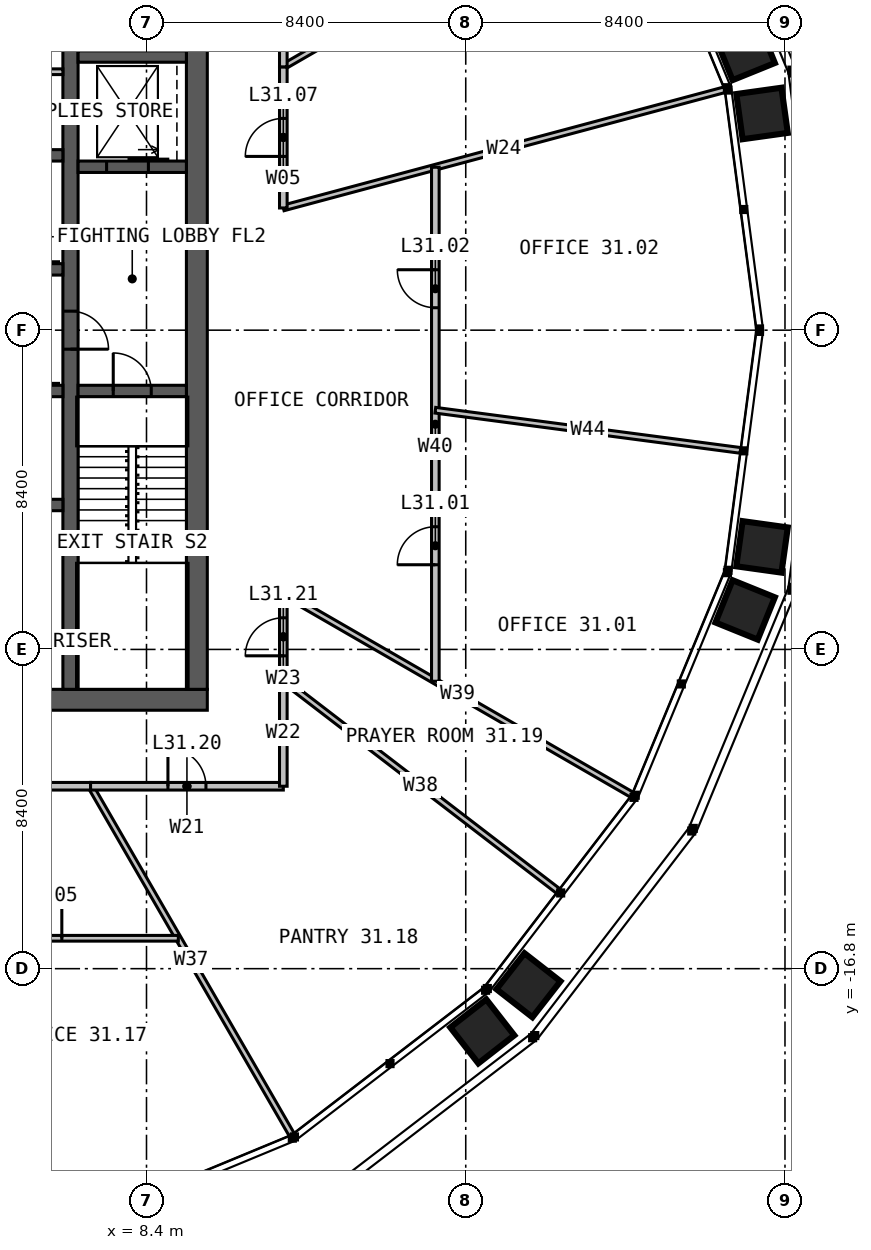
"""IFC4 building model, lengths in metres.
Left out: names, types, materials, properties, quantities, classifications, styles, units other than length and angle.
Written with IfcOpenShell. Run it as: python <this file> out.ifc"""

import sys

from ifc_helpers import new_model, si_unit, direction, frame, frame_2d, origin, place, context, subcontext, project, spatial, rectangle, extrude, element, fill, save


model = new_model("IFC4")
c1 = context("Model", 3, precision=1e-05, world=origin(), true_north=direction((0.0, 1.0)))
c2 = subcontext(c1, "Body", "Model", "MODEL_VIEW")
j1 = project(units=[si_unit("LENGTHUNIT", "METRE"), si_unit("PLANEANGLEUNIT", "RADIAN")], contexts=[c1])
p1 = place(None, origin())
s1 = spatial("IfcSite", under=j1, at=p1, CompositionType="ELEMENT")
p2 = place(p1, origin())
s2 = spatial("IfcBuilding", under=s1, at=p2, CompositionType="ELEMENT")
p3 = place(p2, frame((0.0, 0.0, 130.0)))
s3 = spatial("IfcBuildingStorey", under=s2, at=p3, CompositionType="ELEMENT", Elevation=130.0)
p4 = place(p3, frame((10.0, -9.725, 0.0), z_axis=(0.0, 0.0, 1.0), x_axis=(-1.0, 0.0, 0.0)))
e1 = element("IfcWall", 1, at=p4, inside=s3, PredefinedType="SOLIDWALL", context=c2, shape_type="SweptSolid", body=[
    extrude(rectangle(XDim=20.0, YDim=0.55, at=frame_2d((10.0, 0.0))), origin(), (0.0, 0.0, 1.0), 4.0),
])
p5 = place(p4, frame((6.875, 0.0, 0.0)))
e2 = element("IfcOpeningElement", 2, at=p5, cuts=e1, PredefinedType="OPENING", context=c2, shape_type="SweptSolid", body=[
    extrude(rectangle(XDim=1.2, YDim=2.2, at=frame_2d((0.6, 1.1))), frame((0.0, 0.285, 0.0), z_axis=(0.0, -1.0, 0.0), x_axis=(1.0, 0.0, 0.0)), (0.0, 0.0, 1.0), 0.57),
])
p6 = place(p3, frame((9.725, -9.45, 0.0), z_axis=(0.0, 0.0, 1.0), x_axis=(0.0, 1.0, 0.0)))
e3 = element("IfcWall", 3, at=p6, inside=s3, PredefinedType="SOLIDWALL", context=c2, shape_type="SweptSolid", body=[
    extrude(rectangle(XDim=18.9, YDim=0.55, at=frame_2d((9.45, 0.0))), origin(), (0.0, 0.0, 1.0), 4.0),
])
p7 = place(p3, frame((6.4, 9.45, 0.0), z_axis=(0.0, 0.0, 1.0), x_axis=(0.0, -1.0, 0.0)))
e4 = element("IfcWall", 4, at=p7, inside=s3, PredefinedType="SOLIDWALL", context=c2, shape_type="SweptSolid", body=[
    extrude(rectangle(XDim=18.9, YDim=0.4, at=frame_2d((9.45, 0.0))), origin(), (0.0, 0.0, 1.0), 4.0),
])
p8 = place(p7, frame((8.95, 0.0, 0.0)))
e5 = element("IfcOpeningElement", 5, at=p8, cuts=e4, PredefinedType="OPENING", context=c2, shape_type="SweptSolid", body=[
    extrude(rectangle(XDim=1.0, YDim=2.2, at=frame_2d((0.5, 1.1))), frame((0.0, 0.21, 0.0), z_axis=(0.0, -1.0, 0.0), x_axis=(1.0, 0.0, 0.0)), (0.0, 0.0, 1.0), 0.42),
])
p9 = place(p3, frame((1.35, 1.6, 0.0), z_axis=(0.0, 0.0, 1.0), x_axis=(1.0, 0.0, 0.0)))
e6 = element("IfcWall", 6, at=p9, inside=s3, PredefinedType="SOLIDWALL", context=c2, shape_type="SweptSolid", body=[
    extrude(rectangle(XDim=4.85, YDim=0.3, at=frame_2d((2.425, 0.0))), origin(), (0.0, 0.0, 1.0), 4.0),
])
p10 = place(p9, frame((0.6, 0.0, 0.0)))
e7 = element("IfcOpeningElement", 7, at=p10, cuts=e6, PredefinedType="OPENING", context=c2, shape_type="SweptSolid", body=[
    extrude(rectangle(XDim=1.1, YDim=2.2, at=frame_2d((0.55, 1.1))), frame((0.0, 0.16, 0.0), z_axis=(0.0, -1.0, 0.0), x_axis=(1.0, 0.0, 0.0)), (0.0, 0.0, 1.0), 0.32),
])
p11 = place(p9, frame((3.125, 0.0, 0.0)))
e8 = element("IfcOpeningElement", 8, at=p11, cuts=e6, PredefinedType="OPENING", context=c2, shape_type="SweptSolid", body=[
    extrude(rectangle(XDim=1.1, YDim=2.2, at=frame_2d((0.55, 1.1))), frame((0.0, 0.16, 0.0), z_axis=(0.0, -1.0, 0.0), x_axis=(1.0, 0.0, 0.0)), (0.0, 0.0, 1.0), 0.32),
])
p12 = place(p3, frame((1.35, 4.6, 0.0), z_axis=(0.0, 0.0, 1.0), x_axis=(1.0, 0.0, 0.0)))
e9 = element("IfcWall", 9, at=p12, inside=s3, PredefinedType="SOLIDWALL", context=c2, shape_type="SweptSolid", body=[
    extrude(rectangle(XDim=4.85, YDim=0.3, at=frame_2d((2.425, 0.0))), origin(), (0.0, 0.0, 1.0), 4.0),
])
p13 = place(p3, frame((3.85, -1.6, 0.0), z_axis=(0.0, 0.0, 1.0), x_axis=(1.0, 0.0, 0.0)))
e10 = element("IfcWall", 10, at=p13, inside=s3, PredefinedType="SOLIDWALL", context=c2, shape_type="SweptSolid", body=[
    extrude(rectangle(XDim=2.35, YDim=0.3, at=frame_2d((1.175, 0.0))), origin(), (0.0, 0.0, 1.0), 4.0),
])
p14 = place(p13, frame((0.625, 0.0, 0.0)))
e11 = element("IfcOpeningElement", 11, at=p14, cuts=e10, PredefinedType="OPENING", context=c2, shape_type="SweptSolid", body=[
    extrude(rectangle(XDim=1.1, YDim=2.2, at=frame_2d((0.55, 1.1))), frame((0.0, 0.16, 0.0), z_axis=(0.0, -1.0, 0.0), x_axis=(1.0, 0.0, 0.0)), (0.0, 0.0, 1.0), 0.32),
])
p15 = place(p3, frame((3.85, -4.6, 0.0), z_axis=(0.0, 0.0, 1.0), x_axis=(1.0, 0.0, 0.0)))
e12 = element("IfcWall", 12, at=p15, inside=s3, PredefinedType="SOLIDWALL", context=c2, shape_type="SweptSolid", body=[
    extrude(rectangle(XDim=2.35, YDim=0.3, at=frame_2d((1.175, 0.0))), origin(), (0.0, 0.0, 1.0), 4.0),
])
p16 = place(p3, frame((6.6, -1.6, 0.0), z_axis=(0.0, 0.0, 1.0), x_axis=(1.0, 0.0, 0.0)))
e13 = element("IfcWall", 13, at=p16, inside=s3, PredefinedType="SOLIDWALL", context=c2, shape_type="SweptSolid", body=[
    extrude(rectangle(XDim=2.85, YDim=0.3, at=frame_2d((1.425, 0.0))), origin(), (0.0, 0.0, 1.0), 4.0),
])
p17 = place(p16, frame((0.925, 0.0, 0.0)))
e14 = element("IfcOpeningElement", 14, at=p17, cuts=e13, PredefinedType="OPENING", context=c2, shape_type="SweptSolid", body=[
    extrude(rectangle(XDim=1.0, YDim=2.2, at=frame_2d((0.5, 1.1))), frame((0.0, 0.16, 0.0), z_axis=(0.0, -1.0, 0.0), x_axis=(1.0, 0.0, 0.0)), (0.0, 0.0, 1.0), 0.32),
])
p18 = place(p3, frame((6.6, 4.3, 0.0), z_axis=(0.0, 0.0, 1.0), x_axis=(1.0, 0.0, 0.0)))
e15 = element("IfcWall", 15, at=p18, inside=s3, PredefinedType="SOLIDWALL", context=c2, shape_type="SweptSolid", body=[
    extrude(rectangle(XDim=2.85, YDim=0.3, at=frame_2d((1.425, 0.0))), origin(), (0.0, 0.0, 1.0), 4.0),
])
p19 = place(p18, frame((0.75, 0.0, 0.0)))
e16 = element("IfcOpeningElement", 16, at=p19, cuts=e15, PredefinedType="OPENING", context=c2, shape_type="SweptSolid", body=[
    extrude(rectangle(XDim=1.1, YDim=2.2, at=frame_2d((0.55, 1.1))), frame((0.0, 0.16, 0.0), z_axis=(0.0, -1.0, 0.0), x_axis=(1.0, 0.0, 0.0)), (0.0, 0.0, 1.0), 0.32),
])
p20 = place(p3, frame((6.6, 7.2, 0.0), z_axis=(0.0, 0.0, 1.0), x_axis=(1.0, 0.0, 0.0)))
e17 = element("IfcWall", 17, at=p20, inside=s3, PredefinedType="SOLIDWALL", context=c2, shape_type="SweptSolid", body=[
    extrude(rectangle(XDim=2.85, YDim=0.3, at=frame_2d((1.425, 0.0))), origin(), (0.0, 0.0, 1.0), 4.0),
])
p21 = place(p3, frame((1.35, 6.8, 0.0), z_axis=(0.0, 0.0, 1.0), x_axis=(1.0, 0.0, 0.0)))
e18 = element("IfcWall", 18, at=p21, inside=s3, PredefinedType="PARTITIONING", context=c2, shape_type="SweptSolid", body=[
    extrude(rectangle(XDim=4.85, YDim=0.15, at=frame_2d((2.425, 0.0))), origin(), (0.0, 0.0, 1.0), 3.75),
])
p22 = place(p21, frame((3.15, 0.0, 0.0)))
e19 = element("IfcOpeningElement", 19, at=p22, cuts=e18, PredefinedType="OPENING", context=c2, shape_type="SweptSolid", body=[
    extrude(rectangle(XDim=0.9, YDim=2.2, at=frame_2d((0.45, 1.1))), frame((0.0, 0.085, 0.0), z_axis=(0.0, -1.0, 0.0), x_axis=(1.0, 0.0, 0.0)), (0.0, 0.0, 1.0), 0.17),
])
p23 = place(p3, frame((12.0, -6.928, 0.0), z_axis=(0.0, 0.0, 1.0), x_axis=(0.866023526577, -0.500003251404, 0.0)))
e20 = element("IfcWall", 20, at=p23, inside=s3, PredefinedType="PARTITIONING", context=c2, shape_type="SweptSolid", body=[
    extrude(rectangle(XDim=10.587, YDim=0.15, at=frame_2d((5.293, 0.0))), origin(), (0.0, 0.0, 1.0), 2.79),
])
p24 = place(p3, frame((12.0, 3.215, 0.0), z_axis=(0.0, 0.0, 1.0), x_axis=(0.965923753467, 0.258826780857, 0.0)))
e21 = element("IfcWall", 21, at=p24, inside=s3, PredefinedType="PARTITIONING", context=c2, shape_type="SweptSolid", body=[
    extrude(rectangle(XDim=12.02, YDim=0.15, at=frame_2d((6.01, 0.0))), origin(), (0.0, 0.0, 1.0), 2.79),
])
for number, where, z_axis, x_axis in (
    (22, (12.0, 6.928, 0.0), (0.0, 0.0, 1.0), (0.866, 0.5, 0.0)),
    (23, (6.928, -12.0, 0.0), (0.0, 0.0, 1.0), (0.5, -0.866, 0.0)),
):
    element("IfcWall", number, at=place(p3, frame(where, z_axis=z_axis, x_axis=x_axis)), inside=s3, PredefinedType="PARTITIONING", context=c2, shape_type="SweptSolid", body=[
        extrude(rectangle(XDim=10.587, YDim=0.15, at=frame_2d((5.293, 0.0))), origin(), (0.0, 0.0, 1.0), 2.79),
    ])
p25 = place(p3, frame((12.0, -9.208, 0.0), z_axis=(0.0, 0.0, 1.0), x_axis=(0.793367728965, -0.608742676865, 0.0)))
e24 = element("IfcWall", 24, at=p25, inside=s3, PredefinedType="PARTITIONING", context=c2, shape_type="SweptSolid", body=[
    extrude(rectangle(XDim=9.108, YDim=0.15, at=frame_2d((4.554, 0.0))), origin(), (0.0, 0.0, 1.0), 2.79),
])
p26 = place(p3, frame((16.0, -9.238, 0.0), z_axis=(0.0, 0.0, 1.0), x_axis=(0.0, 1.0, 0.0)))
e25 = element("IfcWall", 25, at=p26, inside=s3, PredefinedType="PARTITIONING", context=c2, shape_type="SweptSolid", body=[
    extrude(rectangle(XDim=13.525, YDim=0.2, at=frame_2d((6.762, 0.0))), origin(), (0.0, 0.0, 1.0), 3.8),
])
p27 = place(p26, frame((3.066, 0.0, 0.0)))
e26 = element("IfcOpeningElement", 26, at=p27, cuts=e25, PredefinedType="OPENING", context=c2, shape_type="SweptSolid", body=[
    extrude(rectangle(XDim=1.0, YDim=2.2, at=frame_2d((0.5, 1.1))), frame((0.0, 0.11, 0.0), z_axis=(0.0, -1.0, 0.0), x_axis=(1.0, 0.0, 0.0)), (0.0, 0.0, 1.0), 0.22),
])
p28 = place(p26, frame((9.828, 0.0, 0.0)))
e27 = element("IfcOpeningElement", 27, at=p28, cuts=e25, PredefinedType="OPENING", context=c2, shape_type="SweptSolid", body=[
    extrude(rectangle(XDim=1.0, YDim=2.2, at=frame_2d((0.5, 1.1))), frame((0.0, 0.11, 0.0), z_axis=(0.0, -1.0, 0.0), x_axis=(1.0, 0.0, 0.0)), (0.0, 0.0, 1.0), 0.22),
])
p29 = place(p3, frame((16.0, -2.106, 0.0), z_axis=(0.0, 0.0, 1.0), x_axis=(0.99144669858, -0.130512236494, 0.0)))
e28 = element("IfcWall", 28, at=p29, inside=s3, PredefinedType="PARTITIONING", context=c2, shape_type="SweptSolid", body=[
    extrude(rectangle(XDim=8.096, YDim=0.15, at=frame_2d((4.048, 0.0))), origin(), (0.0, 0.0, 1.0), 2.79),
])
p30 = place(p3, frame((12.0, 3.215, 0.0), z_axis=(0.0, 0.0, 1.0), x_axis=(0.0, 1.0, 0.0)))
e29 = element("IfcWall", 29, at=p30, inside=s3, PredefinedType="PARTITIONING", context=c2, shape_type="SweptSolid", body=[
    extrude(rectangle(XDim=3.713, YDim=0.2, at=frame_2d((1.856, 0.0))), origin(), (0.0, 0.0, 1.0), 3.8),
])
p31 = place(p30, frame((1.356, 0.0, 0.0)))
e30 = element("IfcOpeningElement", 30, at=p31, cuts=e29, PredefinedType="OPENING", context=c2, shape_type="SweptSolid", body=[
    extrude(rectangle(XDim=1.0, YDim=2.2, at=frame_2d((0.5, 1.1))), frame((0.0, 0.11, 0.0), z_axis=(0.0, -1.0, 0.0), x_axis=(1.0, 0.0, 0.0)), (0.0, 0.0, 1.0), 0.22),
])
p32 = place(p3, frame((12.0, 6.928, 0.0), z_axis=(0.0, 0.0, 1.0), x_axis=(0.0, 1.0, 0.0)))
e31 = element("IfcWall", 31, at=p32, inside=s3, PredefinedType="PARTITIONING", context=c2, shape_type="SweptSolid", body=[
    extrude(rectangle(XDim=5.072, YDim=0.2, at=frame_2d((2.536, 0.0))), origin(), (0.0, 0.0, 1.0), 3.8),
])
p33 = place(p32, frame((2.036, 0.0, 0.0)))
e32 = element("IfcOpeningElement", 32, at=p33, cuts=e31, PredefinedType="OPENING", context=c2, shape_type="SweptSolid", body=[
    extrude(rectangle(XDim=1.0, YDim=2.2, at=frame_2d((0.5, 1.1))), frame((0.0, 0.11, 0.0), z_axis=(0.0, -1.0, 0.0), x_axis=(1.0, 0.0, 0.0)), (0.0, 0.0, 1.0), 0.22),
])
p34 = place(p3, frame((-9.238, -16.0, 0.0), z_axis=(0.0, 0.0, 1.0), x_axis=(1.0, 0.0, 0.0)))
e33 = element("IfcWall", 33, at=p34, inside=s3, PredefinedType="PARTITIONING", context=c2, shape_type="SweptSolid", body=[
    extrude(rectangle(XDim=18.475, YDim=0.15, at=frame_2d((9.238, 0.0))), origin(), (0.0, 0.0, 1.0), 2.79),
])
p35 = place(p34, frame((3.066, 0.0, 0.0)))
e34 = element("IfcOpeningElement", 34, at=p35, cuts=e33, PredefinedType="OPENING", context=c2, shape_type="SweptSolid", body=[
    extrude(rectangle(XDim=1.0, YDim=2.2, at=frame_2d((0.5, 1.1))), frame((0.0, 0.085, 0.0), z_axis=(0.0, -1.0, 0.0), x_axis=(1.0, 0.0, 0.0)), (0.0, 0.0, 1.0), 0.17),
])
p36 = place(p34, frame((8.738, 0.0, 0.0)))
e35 = element("IfcOpeningElement", 35, at=p36, cuts=e33, PredefinedType="OPENING", context=c2, shape_type="SweptSolid", body=[
    extrude(rectangle(XDim=1.0, YDim=2.2, at=frame_2d((0.5, 1.1))), frame((0.0, 0.085, 0.0), z_axis=(0.0, -1.0, 0.0), x_axis=(1.0, 0.0, 0.0)), (0.0, 0.0, 1.0), 0.17),
])
p37 = place(p34, frame((14.41, 0.0, 0.0)))
e36 = element("IfcOpeningElement", 36, at=p37, cuts=e33, PredefinedType="OPENING", context=c2, shape_type="SweptSolid", body=[
    extrude(rectangle(XDim=1.0, YDim=2.2, at=frame_2d((0.5, 1.1))), frame((0.0, 0.085, 0.0), z_axis=(0.0, -1.0, 0.0), x_axis=(1.0, 0.0, 0.0)), (0.0, 0.0, 1.0), 0.17),
])
p38 = place(p3, frame((-6.928, -12.0, 0.0), z_axis=(0.0, 0.0, 1.0), x_axis=(1.0, 0.0, 0.0)))
e37 = element("IfcWall", 37, at=p38, inside=s3, PredefinedType="PARTITIONING", context=c2, shape_type="SweptSolid", body=[
    extrude(rectangle(XDim=13.856, YDim=0.2, at=frame_2d((6.928, 0.0))), origin(), (0.0, 0.0, 1.0), 3.8),
])
p39 = place(p38, frame((6.028, 0.0, 0.0)))
e38 = element("IfcOpeningElement", 38, at=p39, cuts=e37, PredefinedType="OPENING", context=c2, shape_type="SweptSolid", body=[
    extrude(rectangle(XDim=1.8, YDim=2.2, at=frame_2d((0.9, 1.1))), frame((0.0, 0.11, 0.0), z_axis=(0.0, -1.0, 0.0), x_axis=(1.0, 0.0, 0.0)), (0.0, 0.0, 1.0), 0.22),
])
p40 = place(p3, frame((6.928, -12.0, 0.0), z_axis=(0.0, 0.0, 1.0), x_axis=(1.0, 0.0, 0.0)))
e39 = element("IfcWall", 39, at=p40, inside=s3, PredefinedType="PARTITIONING", context=c2, shape_type="SweptSolid", body=[
    extrude(rectangle(XDim=5.072, YDim=0.2, at=frame_2d((2.536, 0.0))), origin(), (0.0, 0.0, 1.0), 3.8),
])
p41 = place(p40, frame((2.036, 0.0, 0.0)))
e40 = element("IfcOpeningElement", 40, at=p41, cuts=e39, PredefinedType="OPENING", context=c2, shape_type="SweptSolid", body=[
    extrude(rectangle(XDim=1.0, YDim=2.2, at=frame_2d((0.5, 1.1))), frame((0.0, 0.11, 0.0), z_axis=(0.0, -1.0, 0.0), x_axis=(1.0, 0.0, 0.0)), (0.0, 0.0, 1.0), 0.22),
])
p42 = place(p3, frame((12.0, -12.0, 0.0), z_axis=(0.0, 0.0, 1.0), x_axis=(0.0, 1.0, 0.0)))
e41 = element("IfcWall", 41, at=p42, inside=s3, PredefinedType="PARTITIONING", context=c2, shape_type="SweptSolid", body=[
    extrude(rectangle(XDim=2.792, YDim=0.2, at=frame_2d((1.396, 0.0))), origin(), (0.0, 0.0, 1.0), 3.8),
])
p43 = place(p3, frame((12.0, -9.208, 0.0), z_axis=(0.0, 0.0, 1.0), x_axis=(0.0, 1.0, 0.0)))
e42 = element("IfcWall", 42, at=p43, inside=s3, PredefinedType="PARTITIONING", context=c2, shape_type="SweptSolid", body=[
    extrude(rectangle(XDim=2.28, YDim=0.2, at=frame_2d((1.14, 0.0))), origin(), (0.0, 0.0, 1.0), 3.8),
])
p44 = place(p43, frame((0.64, 0.0, 0.0)))
e43 = element("IfcOpeningElement", 43, at=p44, cuts=e42, PredefinedType="OPENING", context=c2, shape_type="SweptSolid", body=[
    extrude(rectangle(XDim=1.0, YDim=2.2, at=frame_2d((0.5, 1.1))), frame((0.0, 0.11, 0.0), z_axis=(0.0, -1.0, 0.0), x_axis=(1.0, 0.0, 0.0)), (0.0, 0.0, 1.0), 0.22),
])
p45 = place(p8, origin())
e44 = element("IfcDoor", 44, at=p45, inside=s3, OperationType="SINGLE_SWING_RIGHT", PredefinedType="DOOR", context=c2, shape_type="SweptSolid", body=[
    extrude(rectangle(XDim=1.0, YDim=2.2, at=frame_2d((0.5, 1.1))), frame((0.0, 0.025, 0.0), z_axis=(0.0, -1.0, 0.0), x_axis=(1.0, 0.0, 0.0)), (0.0, 0.0, 1.0), 0.05),
])
fill(e5, e44)
p46 = place(p17, origin())
e45 = element("IfcDoor", 45, at=p46, inside=s3, OperationType="SINGLE_SWING_LEFT", PredefinedType="DOOR", context=c2, shape_type="SweptSolid", body=[
    extrude(rectangle(XDim=1.0, YDim=2.2, at=frame_2d((0.5, 1.1))), frame((0.0, 0.025, 0.0), z_axis=(0.0, -1.0, 0.0), x_axis=(1.0, 0.0, 0.0)), (0.0, 0.0, 1.0), 0.05),
])
fill(e14, e45)
p47 = place(p19, origin())
e46 = element("IfcDoor", 46, at=p47, inside=s3, OperationType="SLIDING_TO_LEFT", PredefinedType="DOOR", context=c2, shape_type="SweptSolid", body=[
    extrude(rectangle(XDim=1.1, YDim=2.2, at=frame_2d((0.55, 1.1))), frame((0.0, 0.025, 0.0), z_axis=(0.0, -1.0, 0.0), x_axis=(1.0, 0.0, 0.0)), (0.0, 0.0, 1.0), 0.05),
])
fill(e16, e46)
p48 = place(p27, origin())
e47 = element("IfcDoor", 47, at=p48, inside=s3, OperationType="SINGLE_SWING_LEFT", PredefinedType="DOOR", context=c2, shape_type="SweptSolid", body=[
    extrude(rectangle(XDim=1.0, YDim=2.2, at=frame_2d((0.5, 1.1))), frame((0.0, 0.025, 0.0), z_axis=(0.0, -1.0, 0.0), x_axis=(1.0, 0.0, 0.0)), (0.0, 0.0, 1.0), 0.05),
])
fill(e26, e47)
p49 = place(p28, origin())
e48 = element("IfcDoor", 48, at=p49, inside=s3, OperationType="SINGLE_SWING_RIGHT", PredefinedType="DOOR", context=c2, shape_type="SweptSolid", body=[
    extrude(rectangle(XDim=1.0, YDim=2.2, at=frame_2d((0.5, 1.1))), frame((0.0, 0.025, 0.0), z_axis=(0.0, -1.0, 0.0), x_axis=(1.0, 0.0, 0.0)), (0.0, 0.0, 1.0), 0.05),
])
fill(e27, e48)
p50 = place(p31, origin())
e49 = element("IfcDoor", 49, at=p50, inside=s3, OperationType="SINGLE_SWING_LEFT", PredefinedType="DOOR", context=c2, shape_type="SweptSolid", body=[
    extrude(rectangle(XDim=1.0, YDim=2.2, at=frame_2d((0.5, 1.1))), frame((0.0, 0.025, 0.0), z_axis=(0.0, -1.0, 0.0), x_axis=(1.0, 0.0, 0.0)), (0.0, 0.0, 1.0), 0.05),
])
fill(e30, e49)
p51 = place(p37, origin())
e50 = element("IfcDoor", 50, at=p51, inside=s3, OperationType="SINGLE_SWING_RIGHT", PredefinedType="DOOR", context=c2, shape_type="SweptSolid", body=[
    extrude(rectangle(XDim=1.0, YDim=2.2, at=frame_2d((0.5, 1.1))), frame((0.0, 0.025, 0.0), z_axis=(0.0, -1.0, 0.0), x_axis=(1.0, 0.0, 0.0)), (0.0, 0.0, 1.0), 0.05),
])
fill(e36, e50)
p52 = place(p41, origin())
e51 = element("IfcDoor", 51, at=p52, inside=s3, OperationType="SINGLE_SWING_LEFT", PredefinedType="DOOR", context=c2, shape_type="SweptSolid", body=[
    extrude(rectangle(XDim=1.0, YDim=2.2, at=frame_2d((0.5, 1.1))), frame((0.0, 0.025, 0.0), z_axis=(0.0, -1.0, 0.0), x_axis=(1.0, 0.0, 0.0)), (0.0, 0.0, 1.0), 0.05),
])
fill(e40, e51)
p53 = place(p44, origin())
e52 = element("IfcDoor", 52, at=p53, inside=s3, OperationType="SINGLE_SWING_LEFT", PredefinedType="DOOR", context=c2, shape_type="SweptSolid", body=[
    extrude(rectangle(XDim=1.0, YDim=2.2, at=frame_2d((0.5, 1.1))), frame((0.0, 0.025, 0.0), z_axis=(0.0, -1.0, 0.0), x_axis=(1.0, 0.0, 0.0)), (0.0, 0.0, 1.0), 0.05),
])
fill(e43, e52)
save(model, sys.argv[1])
